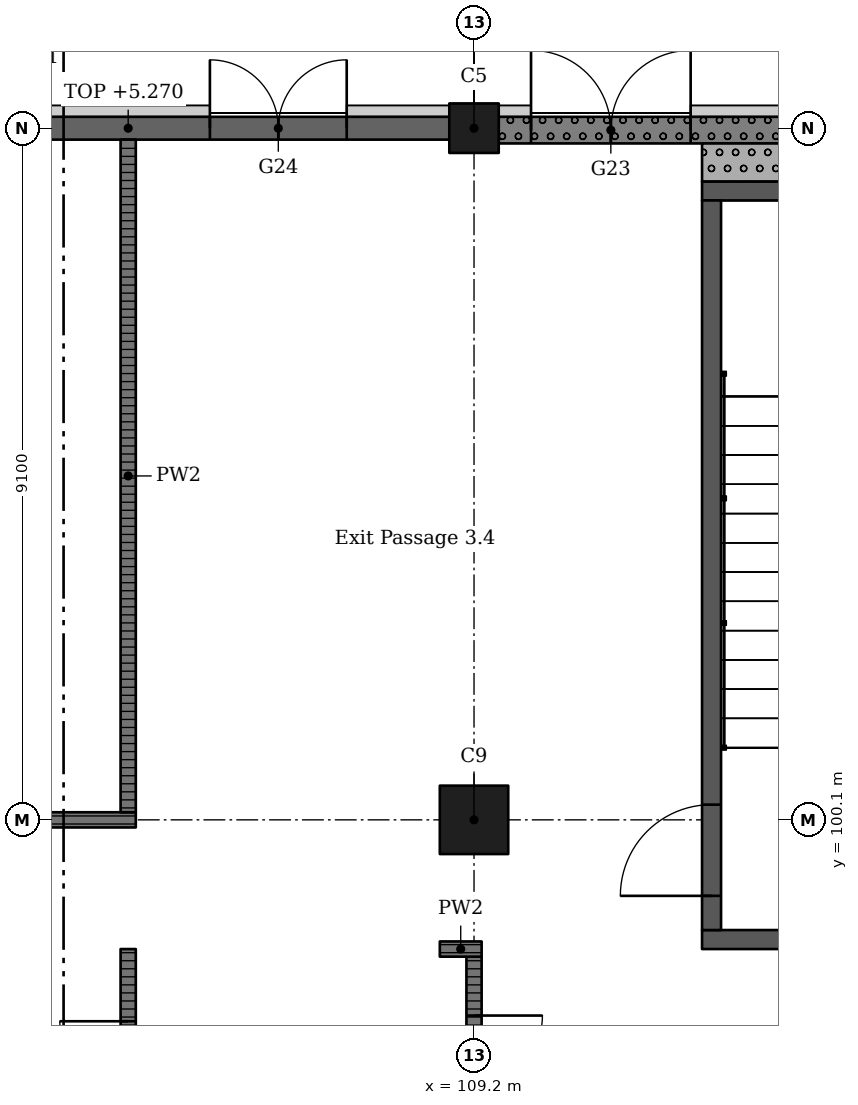
"""IFC4 building model, lengths in metres.
Left out: names, types, materials, properties, quantities, classifications, styles, units other than length and angle.
Written with IfcOpenShell. Run it as: python <this file> out.ifc"""

import sys

from ifc_helpers import new_model, si_unit, direction, frame, frame_2d, origin, origin_2d, place, context, subcontext, project, spatial, rectangle, extrude, element, fill, save


model = new_model("IFC4")
c1 = context("Model", 3, precision=1e-05, world=origin(), true_north=direction((0.0, 1.0)))
c2 = subcontext(c1, "Body", "Model", "MODEL_VIEW")
j1 = project(units=[si_unit("LENGTHUNIT", "METRE"), si_unit("PLANEANGLEUNIT", "RADIAN")], contexts=[c1])
p1 = place(None, origin())
s1 = spatial("IfcSite", under=j1, at=p1, CompositionType="ELEMENT")
p2 = place(p1, origin())
s2 = spatial("IfcBuilding", under=s1, at=p2, CompositionType="ELEMENT")
p3 = place(p2, origin())
s3 = spatial("IfcBuildingStorey", under=s2, at=p3, CompositionType="ELEMENT", Elevation=0.0)
p4 = place(p3, frame((109.2, 100.1, -0.4), z_axis=(0.0, 0.0, 1.0), x_axis=(1.0, 0.0, 0.0)))
e1 = element("IfcColumn", 1, at=p4, inside=s3, PredefinedType="COLUMN", context=c2, shape_type="SweptSolid", body=[
    extrude(rectangle(XDim=0.9, YDim=0.9, at=origin_2d()), origin(), (0.0, 0.0, 1.0), 6.77),
])
p5 = place(p3, frame((109.2, 109.2, -0.4), z_axis=(0.0, 0.0, 1.0), x_axis=(1.0, 0.0, 0.0)))
e2 = element("IfcColumn", 2, at=p5, inside=s3, PredefinedType="COLUMN", context=c2, shape_type="SweptSolid", body=[
    extrude(rectangle(XDim=0.65, YDim=0.65, at=origin_2d()), origin(), (0.0, 0.0, 1.0), 6.77),
])
p6 = place(p3, frame((117.6, 98.525, -0.4), z_axis=(0.0, 0.0, 1.0), x_axis=(-1.0, 0.0, 0.0)))
e3 = element("IfcWall", 3, at=p6, inside=s3, PredefinedType="SHEAR", context=c2, shape_type="SweptSolid", body=[
    extrude(rectangle(XDim=5.4, YDim=0.25, at=frame_2d((2.7, 0.0))), origin(), (0.0, 0.0, 1.0), 6.77),
])
p7 = place(p6, frame((1.5, 0.0, 0.4)))
e4 = element("IfcOpeningElement", 4, at=p7, cuts=e3, PredefinedType="OPENING", context=c2, shape_type="SweptSolid", body=[
    extrude(rectangle(XDim=2.4, YDim=2.1, at=frame_2d((1.2, 1.05))), frame((0.0, 0.135, 0.0), z_axis=(0.0, -1.0, 0.0), x_axis=(1.0, 0.0, 0.0)), (0.0, 0.0, 1.0), 0.27),
])
p8 = place(p3, frame((117.6, 108.375, -0.4), z_axis=(0.0, 0.0, 1.0), x_axis=(-1.0, 0.0, 0.0)))
e5 = element("IfcWall", 5, at=p8, inside=s3, PredefinedType="SHEAR", context=c2, shape_type="SweptSolid", body=[
    extrude(rectangle(XDim=5.4, YDim=0.25, at=frame_2d((2.7, 0.0))), origin(), (0.0, 0.0, 1.0), 6.77),
])
p9 = place(p3, frame((112.325, 108.25, -0.4), z_axis=(0.0, 0.0, 1.0), x_axis=(0.0, -1.0, 0.0)))
e6 = element("IfcWall", 6, at=p9, inside=s3, PredefinedType="SHEAR", context=c2, shape_type="SweptSolid", body=[
    extrude(rectangle(XDim=9.6, YDim=0.25, at=frame_2d((4.8, 0.0))), origin(), (0.0, 0.0, 1.0), 6.77),
])
p10 = place(p9, frame((7.95, 0.0, 0.4)))
e7 = element("IfcOpeningElement", 7, at=p10, cuts=e6, PredefinedType="OPENING", context=c2, shape_type="SweptSolid", body=[
    extrude(rectangle(XDim=1.2, YDim=2.1, at=frame_2d((0.6, 1.05))), frame((0.0, 0.135, 0.0), z_axis=(0.0, -1.0, 0.0), x_axis=(1.0, 0.0, 0.0)), (0.0, 0.0, 1.0), 0.27),
])
p11 = place(p3, frame((118.025, 109.175, 0.0), z_axis=(0.0, 0.0, 1.0), x_axis=(-1.0, 0.0, 0.0)))
e8 = element("IfcWall", 8, at=p11, inside=s3, PredefinedType="SOLIDWALL", context=c2, shape_type="SweptSolid", body=[
    extrude(rectangle(XDim=8.5, YDim=0.35, at=frame_2d((4.25, 0.0))), origin(), (0.0, 0.0, 1.0), 5.27),
])
p12 = place(p11, frame((5.975, 0.0, 0.0)))
e9 = element("IfcOpeningElement", 9, at=p12, cuts=e8, PredefinedType="OPENING", context=c2, shape_type="SweptSolid", body=[
    extrude(rectangle(XDim=2.1, YDim=2.4, at=frame_2d((1.05, 1.2))), frame((0.0, 0.185, 0.0), z_axis=(0.0, -1.0, 0.0), x_axis=(1.0, 0.0, 0.0)), (0.0, 0.0, 1.0), 0.37),
])
p13 = place(p3, frame((108.875, 109.2, 0.0), z_axis=(0.0, 0.0, 1.0), x_axis=(-1.0, 0.0, 0.0)))
e10 = element("IfcWall", 10, at=p13, inside=s3, PredefinedType="SOLIDWALL", context=c2, shape_type="SweptSolid", body=[
    extrude(rectangle(XDim=8.45, YDim=0.3, at=frame_2d((4.225, 0.0))), origin(), (0.0, 0.0, 1.0), 5.27),
])
p14 = place(p13, frame((1.35, 0.0, 0.0)))
e11 = element("IfcOpeningElement", 11, at=p14, cuts=e10, PredefinedType="OPENING", context=c2, shape_type="SweptSolid", body=[
    extrude(rectangle(XDim=1.8, YDim=2.4, at=frame_2d((0.9, 1.2))), frame((0.0, 0.16, 0.0), z_axis=(0.0, -1.0, 0.0), x_axis=(1.0, 0.0, 0.0)), (0.0, 0.0, 1.0), 0.32),
])
p15 = place(p13, frame((5.438, 0.0, 1.0)))
e12 = element("IfcOpeningElement", 12, at=p15, cuts=e10, PredefinedType="OPENING", context=c2, shape_type="SweptSolid", body=[
    extrude(rectangle(XDim=1.8, YDim=1.2, at=frame_2d((0.9, 0.6))), frame((0.0, 0.16, 0.0), z_axis=(0.0, -1.0, 0.0), x_axis=(1.0, 0.0, 0.0)), (0.0, 0.0, 1.0), 0.32),
])
p16 = place(p3, frame((112.2, 108.75, 0.0), z_axis=(0.0, 0.0, 1.0), x_axis=(1.0, 0.0, 0.0)))
e13 = element("IfcWall", 13, at=p16, inside=s3, PredefinedType="SOLIDWALL", context=c2, shape_type="SweptSolid", body=[
    extrude(rectangle(XDim=5.4, YDim=0.5, at=frame_2d((2.7, 0.0))), origin(), (0.0, 0.0, 1.0), 6.37),
])
p17 = place(p3, frame((100.1, 100.1, 0.0), z_axis=(0.0, 0.0, 1.0), x_axis=(1.0, 0.0, 0.0)))
e14 = element("IfcWall", 14, at=p17, inside=s3, PredefinedType="PARTITIONING", context=c2, shape_type="SweptSolid", body=[
    extrude(rectangle(XDim=4.65, YDim=0.2, at=frame_2d((2.325, 0.0))), origin(), (0.0, 0.0, 1.0), 5.32),
])
p18 = place(p17, frame((1.85, 0.0, 0.0)))
e15 = element("IfcOpeningElement", 15, at=p18, cuts=e14, PredefinedType="OPENING", context=c2, shape_type="SweptSolid", body=[
    extrude(rectangle(XDim=1.0, YDim=2.1, at=frame_2d((0.5, 1.05))), frame((0.0, 0.11, 0.0), z_axis=(0.0, -1.0, 0.0), x_axis=(1.0, 0.0, 0.0)), (0.0, 0.0, 1.0), 0.22),
])
p19 = place(p3, frame((104.65, 91.1, 0.0), z_axis=(0.0, 0.0, 1.0), x_axis=(0.0, 1.0, 0.0)))
e16 = element("IfcWall", 16, at=p19, inside=s3, PredefinedType="PARTITIONING", context=c2, shape_type="SweptSolid", body=[
    extrude(rectangle(XDim=7.3, YDim=0.2, at=frame_2d((3.65, 0.0))), origin(), (0.0, 0.0, 1.0), 6.02),
])
p20 = place(p19, frame((0.95, 0.0, 0.0)))
e17 = element("IfcOpeningElement", 17, at=p20, cuts=e16, PredefinedType="OPENING", context=c2, shape_type="SweptSolid", body=[
    extrude(rectangle(XDim=1.8, YDim=2.4, at=frame_2d((0.9, 1.2))), frame((0.0, 0.11, 0.0), z_axis=(0.0, -1.0, 0.0), x_axis=(1.0, 0.0, 0.0)), (0.0, 0.0, 1.0), 0.22),
])
p21 = place(p19, frame((4.55, 0.0, 0.0)))
e18 = element("IfcOpeningElement", 18, at=p21, cuts=e16, PredefinedType="OPENING", context=c2, shape_type="SweptSolid", body=[
    extrude(rectangle(XDim=1.8, YDim=2.4, at=frame_2d((0.9, 1.2))), frame((0.0, 0.11, 0.0), z_axis=(0.0, -1.0, 0.0), x_axis=(1.0, 0.0, 0.0)), (0.0, 0.0, 1.0), 0.22),
])
p22 = place(p3, frame((104.65, 100.2, 0.0), z_axis=(0.0, 0.0, 1.0), x_axis=(0.0, 1.0, 0.0)))
e19 = element("IfcWall", 19, at=p22, inside=s3, PredefinedType="PARTITIONING", context=c2, shape_type="SweptSolid", body=[
    extrude(rectangle(XDim=8.85, YDim=0.2, at=frame_2d((4.425, 0.0))), origin(), (0.0, 0.0, 1.0), 6.02),
])
p23 = place(p3, frame((109.2, 91.475, 0.0), z_axis=(0.0, 0.0, 1.0), x_axis=(0.0, 1.0, 0.0)))
e20 = element("IfcWall", 20, at=p23, inside=s3, PredefinedType="PARTITIONING", context=c2, shape_type="SweptSolid", body=[
    extrude(rectangle(XDim=6.825, YDim=0.2, at=frame_2d((3.413, 0.0))), origin(), (0.0, 0.0, 1.0), 5.32),
])
p24 = place(p23, frame((0.85, 0.0, 0.0)))
e21 = element("IfcOpeningElement", 21, at=p24, cuts=e20, PredefinedType="OPENING", context=c2, shape_type="SweptSolid", body=[
    extrude(rectangle(XDim=1.8, YDim=2.4, at=frame_2d((0.9, 1.2))), frame((0.0, 0.11, 0.0), z_axis=(0.0, -1.0, 0.0), x_axis=(1.0, 0.0, 0.0)), (0.0, 0.0, 1.0), 0.22),
])
p25 = place(p23, frame((4.25, 0.0, 0.0)))
e22 = element("IfcOpeningElement", 22, at=p25, cuts=e20, PredefinedType="OPENING", context=c2, shape_type="SweptSolid", body=[
    extrude(rectangle(XDim=1.8, YDim=2.4, at=frame_2d((0.9, 1.2))), frame((0.0, 0.11, 0.0), z_axis=(0.0, -1.0, 0.0), x_axis=(1.0, 0.0, 0.0)), (0.0, 0.0, 1.0), 0.22),
])
p26 = place(p3, frame((109.3, 98.4, 0.0), z_axis=(0.0, 0.0, 1.0), x_axis=(-1.0, 0.0, 0.0)))
e23 = element("IfcWall", 23, at=p26, inside=s3, PredefinedType="PARTITIONING", context=c2, shape_type="SweptSolid", body=[
    extrude(rectangle(XDim=0.55, YDim=0.2, at=frame_2d((0.275, 0.0))), origin(), (0.0, 0.0, 1.0), 6.02),
])
p27 = place(p12, frame((2.1, 0.0, 0.0), z_axis=(0.0, 0.0, 1.0), x_axis=(-1.0, 0.0, 0.0)))
e24 = element("IfcDoor", 24, at=p27, inside=s3, OperationType="DOUBLE_DOOR_SINGLE_SWING", PredefinedType="DOOR", context=c2, shape_type="SweptSolid", body=[
    extrude(rectangle(XDim=2.1, YDim=2.4, at=frame_2d((1.05, 1.2))), frame((0.0, 0.025, 0.0), z_axis=(0.0, -1.0, 0.0), x_axis=(1.0, 0.0, 0.0)), (0.0, 0.0, 1.0), 0.05),
])
fill(e9, e24)
p28 = place(p14, frame((1.8, 0.0, 0.0), z_axis=(0.0, 0.0, 1.0), x_axis=(-1.0, 0.0, 0.0)))
e25 = element("IfcDoor", 25, at=p28, inside=s3, OperationType="DOUBLE_DOOR_SINGLE_SWING", PredefinedType="DOOR", context=c2, shape_type="SweptSolid", body=[
    extrude(rectangle(XDim=1.8, YDim=2.4, at=frame_2d((0.9, 1.2))), frame((0.0, 0.025, 0.0), z_axis=(0.0, -1.0, 0.0), x_axis=(1.0, 0.0, 0.0)), (0.0, 0.0, 1.0), 0.05),
])
fill(e11, e25)
p29 = place(p25, origin())
e26 = element("IfcDoor", 26, at=p29, inside=s3, OperationType="DOUBLE_DOOR_SINGLE_SWING", PredefinedType="DOOR", context=c2, shape_type="SweptSolid", body=[
    extrude(rectangle(XDim=1.8, YDim=2.4, at=frame_2d((0.9, 1.2))), frame((0.0, 0.025, 0.0), z_axis=(0.0, -1.0, 0.0), x_axis=(1.0, 0.0, 0.0)), (0.0, 0.0, 1.0), 0.05),
])
fill(e22, e26)
p30 = place(p21, origin())
e27 = element("IfcDoor", 27, at=p30, inside=s3, OperationType="DOUBLE_DOOR_SINGLE_SWING", PredefinedType="DOOR", context=c2, shape_type="SweptSolid", body=[
    extrude(rectangle(XDim=1.8, YDim=2.4, at=frame_2d((0.9, 1.2))), frame((0.0, 0.025, 0.0), z_axis=(0.0, -1.0, 0.0), x_axis=(1.0, 0.0, 0.0)), (0.0, 0.0, 1.0), 0.05),
])
fill(e18, e27)
p31 = place(p10, origin())
e28 = element("IfcDoor", 28, at=p31, inside=s3, OperationType="SINGLE_SWING_RIGHT", PredefinedType="DOOR", context=c2, shape_type="SweptSolid", body=[
    extrude(rectangle(XDim=1.2, YDim=2.1, at=frame_2d((0.6, 1.05))), frame((0.0, 0.025, 0.0), z_axis=(0.0, -1.0, 0.0), x_axis=(1.0, 0.0, 0.0)), (0.0, 0.0, 1.0), 0.05),
])
fill(e7, e28)
save(model, sys.argv[1])
